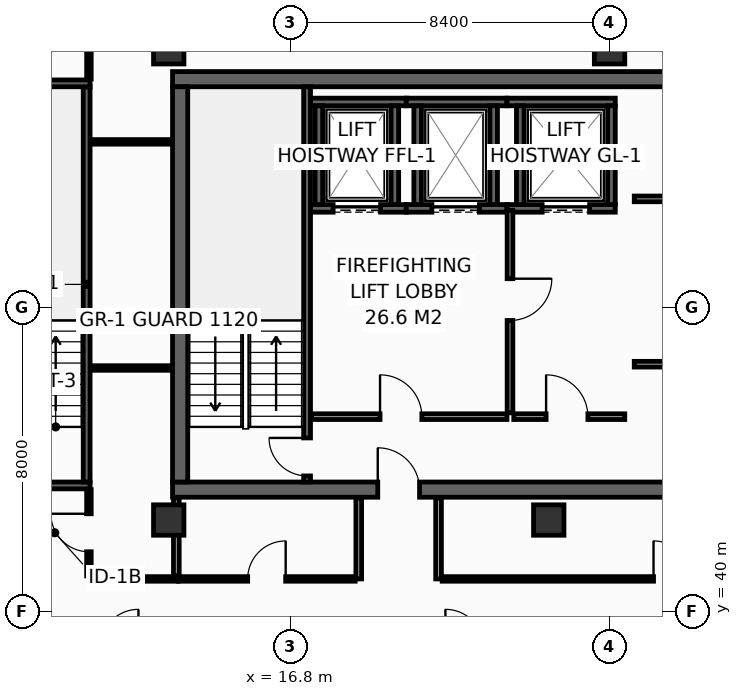
"""IFC4 building model, lengths in metres.
Left out: names, types, materials, properties, quantities, classifications, styles, units other than length and angle.
Written with IfcOpenShell. Run it as: python <this file> out.ifc"""

import sys

from ifc_helpers import new_model, si_unit, direction, frame, frame_2d, origin, origin_2d, place, context, subcontext, project, spatial, rectangle, hollow_rectangle, extrude, element, fill, save


model = new_model("IFC4")
c1 = context("Model", 3, precision=1e-05, world=origin(), true_north=direction((0.0, 1.0)))
c2 = subcontext(c1, "Body", "Model", "MODEL_VIEW")
j1 = project(units=[si_unit("LENGTHUNIT", "METRE"), si_unit("PLANEANGLEUNIT", "RADIAN")], contexts=[c1])
p1 = place(None, origin())
s1 = spatial("IfcSite", under=j1, at=p1, CompositionType="ELEMENT")
p2 = place(p1, origin())
s2 = spatial("IfcBuilding", under=s1, at=p2, CompositionType="ELEMENT")
p3 = place(p2, frame((0.0, 0.0, 253.4)))
s3 = spatial("IfcBuildingStorey", under=s2, at=p3, CompositionType="ELEMENT", Elevation=253.4)
p4 = place(p3, frame((13.7, 43.2, 0.0), z_axis=(0.0, 0.0, 1.0), x_axis=(1.0, 0.0, 0.0)))
e1 = element("IfcWall", 1, at=p4, inside=s3, PredefinedType="SHEAR", context=c2, shape_type="SweptSolid", body=[
    extrude(rectangle(XDim=32.5, YDim=0.4, at=frame_2d((16.25, 0.0))), origin(), (0.0, 0.0, 1.0), 3.55),
])
p5 = place(p4, frame((5.4, 0.0, 0.0)))
e2 = element("IfcOpeningElement", 2, at=p5, cuts=e1, PredefinedType="OPENING", context=c2, shape_type="SweptSolid", body=[
    extrude(rectangle(XDim=1.1, YDim=2.15, at=frame_2d((0.55, 1.075))), frame((0.0, 0.21, 0.0), z_axis=(0.0, -1.0, 0.0), x_axis=(1.0, 0.0, 0.0)), (0.0, 0.0, 1.0), 0.42),
])
p6 = place(p4, frame((25.6, 0.0, 0.0)))
e3 = element("IfcOpeningElement", 3, at=p6, cuts=e1, PredefinedType="OPENING", context=c2, shape_type="SweptSolid", body=[
    extrude(rectangle(XDim=1.1, YDim=2.15, at=frame_2d((0.55, 1.075))), frame((0.0, 0.21, 0.0), z_axis=(0.0, -1.0, 0.0), x_axis=(1.0, 0.0, 0.0)), (0.0, 0.0, 1.0), 0.42),
])
p7 = place(p3, frame((13.7, 54.0, 0.0), z_axis=(0.0, 0.0, 1.0), x_axis=(1.0, 0.0, 0.0)))
e4 = element("IfcWall", 4, at=p7, inside=s3, PredefinedType="SHEAR", context=c2, shape_type="SweptSolid", body=[
    extrude(rectangle(XDim=32.5, YDim=0.4, at=frame_2d((16.25, 0.0))), origin(), (0.0, 0.0, 1.0), 3.55),
])
p8 = place(p3, frame((13.9, 43.4, 0.0), z_axis=(0.0, 0.0, 1.0), x_axis=(0.0, 1.0, 0.0)))
e5 = element("IfcWall", 5, at=p8, inside=s3, PredefinedType="SHEAR", context=c2, shape_type="SweptSolid", body=[
    extrude(rectangle(XDim=10.4, YDim=0.4, at=frame_2d((5.2, 0.0))), origin(), (0.0, 0.0, 1.0), 3.55),
])
for number, where, z_axis, x_axis in (
    (6, (13.6, 54.8, 0.0), (0.0, 0.0, 1.0), (1.0, 0.0, 0.0)),
    (7, (25.2, 54.8, 0.0), (0.0, 0.0, 1.0), (1.0, 0.0, 0.0)),
    (8, (13.6, 42.4, 0.0), (0.0, 0.0, 1.0), (1.0, 0.0, 0.0)),
    (9, (23.6, 42.4, 0.0), (0.0, 0.0, 1.0), (1.0, 0.0, 0.0)),
):
    element("IfcColumn", number, at=place(p3, frame(where, z_axis=z_axis, x_axis=x_axis)), inside=s3, PredefinedType="COLUMN", context=c2, shape_type="SweptSolid", body=[
        extrude(hollow_rectangle(XDim=0.8, YDim=0.8, WallThickness=0.036, at=origin_2d()), origin(), (0.0, 0.0, 1.0), 3.8),
    ])
p9 = place(p3, frame((17.33, 50.6, 0.0), z_axis=(0.0, 0.0, 1.0), x_axis=(1.0, 0.0, 0.0)))
e10 = element("IfcWall", 10, at=p9, inside=s3, PredefinedType="SHEAR", context=c2, shape_type="SweptSolid", body=[
    extrude(rectangle(XDim=2.52, YDim=0.2, at=frame_2d((1.26, 0.0))), origin(), (0.0, 0.0, 1.0), 3.55),
])
p10 = place(p9, frame((0.595, 0.0, 0.0)))
e11 = element("IfcOpeningElement", 11, at=p10, cuts=e10, PredefinedType="OPENING", context=c2, shape_type="SweptSolid", body=[
    extrude(rectangle(XDim=1.25, YDim=2.3, at=frame_2d((0.625, 1.15))), frame((0.0, 0.11, 0.0), z_axis=(0.0, -1.0, 0.0), x_axis=(1.0, 0.0, 0.0)), (0.0, 0.0, 1.0), 0.22),
])
p11 = place(p3, frame((17.33, 53.4, 0.0), z_axis=(0.0, 0.0, 1.0), x_axis=(1.0, 0.0, 0.0)))
e12 = element("IfcWall", 12, at=p11, inside=s3, PredefinedType="SHEAR", context=c2, shape_type="SweptSolid", body=[
    extrude(rectangle(XDim=2.52, YDim=0.2, at=frame_2d((1.26, 0.0))), origin(), (0.0, 0.0, 1.0), 3.55),
])
for number, where, z_axis, x_axis in (
    (13, (17.55, 50.7, 0.0), (0.0, 0.0, 1.0), (0.0, 1.0, 0.0)),
    (14, (19.55, 50.7, 0.0), (0.0, 0.0, 1.0), (0.0, 1.0, 0.0)),
):
    element("IfcWall", number, at=place(p3, frame(where, z_axis=z_axis, x_axis=x_axis)), inside=s3, PredefinedType="SHEAR", context=c2, shape_type="SweptSolid", body=[
        extrude(rectangle(XDim=2.6, YDim=0.2, at=frame_2d((1.3, 0.0))), origin(), (0.0, 0.0, 1.0), 3.55),
    ])
p12 = place(p3, frame((19.85, 50.6, 0.0), z_axis=(0.0, 0.0, 1.0), x_axis=(1.0, 0.0, 0.0)))
e15 = element("IfcWall", 15, at=p12, inside=s3, PredefinedType="SHEAR", context=c2, shape_type="SweptSolid", body=[
    extrude(rectangle(XDim=2.65, YDim=0.2, at=frame_2d((1.325, 0.0))), origin(), (0.0, 0.0, 1.0), 3.55),
])
p13 = place(p12, frame((0.675, 0.0, 0.0)))
e16 = element("IfcOpeningElement", 16, at=p13, cuts=e15, PredefinedType="OPENING", context=c2, shape_type="SweptSolid", body=[
    extrude(rectangle(XDim=1.25, YDim=2.3, at=frame_2d((0.625, 1.15))), frame((0.0, 0.11, 0.0), z_axis=(0.0, -1.0, 0.0), x_axis=(1.0, 0.0, 0.0)), (0.0, 0.0, 1.0), 0.22),
])
p14 = place(p3, frame((19.85, 53.4, 0.0), z_axis=(0.0, 0.0, 1.0), x_axis=(1.0, 0.0, 0.0)))
e17 = element("IfcWall", 17, at=p14, inside=s3, PredefinedType="SHEAR", context=c2, shape_type="SweptSolid", body=[
    extrude(rectangle(XDim=2.65, YDim=0.2, at=frame_2d((1.325, 0.0))), origin(), (0.0, 0.0, 1.0), 3.55),
])
for number, where, z_axis, x_axis in (
    (18, (20.15, 50.7, 0.0), (0.0, 0.0, 1.0), (0.0, 1.0, 0.0)),
    (19, (22.15, 50.7, 0.0), (0.0, 0.0, 1.0), (0.0, 1.0, 0.0)),
):
    element("IfcWall", number, at=place(p3, frame(where, z_axis=z_axis, x_axis=x_axis)), inside=s3, PredefinedType="SHEAR", context=c2, shape_type="SweptSolid", body=[
        extrude(rectangle(XDim=2.6, YDim=0.2, at=frame_2d((1.3, 0.0))), origin(), (0.0, 0.0, 1.0), 3.55),
    ])
p15 = place(p3, frame((22.5, 50.6, 0.0), z_axis=(0.0, 0.0, 1.0), x_axis=(1.0, 0.0, 0.0)))
e20 = element("IfcWall", 20, at=p15, inside=s3, PredefinedType="SHEAR", context=c2, shape_type="SweptSolid", body=[
    extrude(rectangle(XDim=2.85, YDim=0.2, at=frame_2d((1.425, 0.0))), origin(), (0.0, 0.0, 1.0), 3.55),
])
p16 = place(p15, frame((0.925, 0.0, 0.0)))
e21 = element("IfcOpeningElement", 21, at=p16, cuts=e20, PredefinedType="OPENING", context=c2, shape_type="SweptSolid", body=[
    extrude(rectangle(XDim=1.25, YDim=2.3, at=frame_2d((0.625, 1.15))), frame((0.0, 0.11, 0.0), z_axis=(0.0, -1.0, 0.0), x_axis=(1.0, 0.0, 0.0)), (0.0, 0.0, 1.0), 0.22),
])
p17 = place(p3, frame((22.5, 53.4, 0.0), z_axis=(0.0, 0.0, 1.0), x_axis=(1.0, 0.0, 0.0)))
e22 = element("IfcWall", 22, at=p17, inside=s3, PredefinedType="SHEAR", context=c2, shape_type="SweptSolid", body=[
    extrude(rectangle(XDim=2.85, YDim=0.2, at=frame_2d((1.425, 0.0))), origin(), (0.0, 0.0, 1.0), 3.55),
])
for number, where, z_axis, x_axis in (
    (23, (22.85, 50.7, 0.0), (0.0, 0.0, 1.0), (0.0, 1.0, 0.0)),
    (24, (25.25, 50.7, 0.0), (0.0, 0.0, 1.0), (0.0, 1.0, 0.0)),
):
    element("IfcWall", number, at=place(p3, frame(where, z_axis=z_axis, x_axis=x_axis)), inside=s3, PredefinedType="SHEAR", context=c2, shape_type="SweptSolid", body=[
        extrude(rectangle(XDim=2.6, YDim=0.2, at=frame_2d((1.3, 0.0))), origin(), (0.0, 0.0, 1.0), 3.55),
    ])
p18 = place(p3, frame((17.24, 43.4, 0.0), z_axis=(0.0, 0.0, 1.0), x_axis=(0.0, 1.0, 0.0)))
e25 = element("IfcWall", 25, at=p18, inside=s3, PredefinedType="SHEAR", context=c2, shape_type="SweptSolid", body=[
    extrude(rectangle(XDim=10.4, YDim=0.18, at=frame_2d((5.2, 0.0))), origin(), (0.0, 0.0, 1.0), 3.55),
])
p19 = place(p18, frame((0.16, 0.0, 0.0)))
e26 = element("IfcOpeningElement", 26, at=p19, cuts=e25, PredefinedType="OPENING", context=c2, shape_type="SweptSolid", body=[
    extrude(rectangle(XDim=1.0, YDim=2.15, at=frame_2d((0.5, 1.075))), frame((0.0, 0.1, 0.0), z_axis=(0.0, -1.0, 0.0), x_axis=(1.0, 0.0, 0.0)), (0.0, 0.0, 1.0), 0.2),
])
p20 = place(p3, frame((8.12, 43.31, 0.0), z_axis=(0.0, 0.0, 1.0), x_axis=(1.0, 0.0, 0.0)))
e27 = element("IfcWall", 27, at=p20, inside=s3, PredefinedType="SHEAR", context=c2, shape_type="SweptSolid", body=[
    extrude(rectangle(XDim=3.41, YDim=0.18, at=frame_2d((1.705, 0.0))), origin(), (0.0, 0.0, 1.0), 3.55),
])
p21 = place(p20, frame((1.15, 0.0, 0.0)))
e28 = element("IfcOpeningElement", 28, at=p21, cuts=e27, PredefinedType="OPENING", context=c2, shape_type="SweptSolid", body=[
    extrude(rectangle(XDim=1.1, YDim=2.15, at=frame_2d((0.55, 1.075))), frame((0.0, 0.1, 0.0), z_axis=(0.0, -1.0, 0.0), x_axis=(1.0, 0.0, 0.0)), (0.0, 0.0, 1.0), 0.2),
])
p22 = place(p3, frame((11.44, 43.4, 0.0), z_axis=(0.0, 0.0, 1.0), x_axis=(0.0, 1.0, 0.0)))
e29 = element("IfcWall", 29, at=p22, inside=s3, PredefinedType="SHEAR", context=c2, shape_type="SweptSolid", body=[
    extrude(rectangle(XDim=10.4, YDim=0.18, at=frame_2d((5.2, 0.0))), origin(), (0.0, 0.0, 1.0), 3.55),
])
p23 = place(p3, frame((11.53, 53.89, 0.0), z_axis=(0.0, 0.0, 1.0), x_axis=(-1.0, 0.0, 0.0)))
e30 = element("IfcWall", 30, at=p23, inside=s3, PredefinedType="SHEAR", context=c2, shape_type="SweptSolid", body=[
    extrude(rectangle(XDim=3.41, YDim=0.18, at=frame_2d((1.705, 0.0))), origin(), (0.0, 0.0, 1.0), 3.55),
])
p24 = place(p3, frame((17.36, 45.12, 0.0), z_axis=(0.0, 0.0, 1.0), x_axis=(1.0, 0.0, 0.0)))
e31 = element("IfcWall", 31, at=p24, inside=s3, PredefinedType="PARTITIONING", context=c2, shape_type="SweptSolid", body=[
    extrude(rectangle(XDim=5.14, YDim=0.15, at=frame_2d((2.57, 0.0))), origin(), (0.0, 0.0, 1.0), 3.55),
])
p25 = place(p24, frame((1.8, 0.0, 0.0)))
e32 = element("IfcOpeningElement", 32, at=p25, cuts=e31, PredefinedType="OPENING", context=c2, shape_type="SweptSolid", body=[
    extrude(rectangle(XDim=1.1, YDim=2.15, at=frame_2d((0.55, 1.075))), frame((0.0, 0.085, 0.0), z_axis=(0.0, -1.0, 0.0), x_axis=(1.0, 0.0, 0.0)), (0.0, 0.0, 1.0), 0.17),
])
p26 = place(p3, frame((22.58, 50.55, 0.0), z_axis=(0.0, 0.0, 1.0), x_axis=(0.0, -1.0, 0.0)))
e33 = element("IfcWall", 33, at=p26, inside=s3, PredefinedType="PARTITIONING", context=c2, shape_type="SweptSolid", body=[
    extrude(rectangle(XDim=5.33, YDim=0.15, at=frame_2d((2.665, 0.0))), origin(), (0.0, 0.0, 1.0), 3.55),
])
p27 = place(p26, frame((1.8, 0.0, 0.0)))
e34 = element("IfcOpeningElement", 34, at=p27, cuts=e33, PredefinedType="OPENING", context=c2, shape_type="SweptSolid", body=[
    extrude(rectangle(XDim=1.1, YDim=2.15, at=frame_2d((0.55, 1.075))), frame((0.0, 0.085, 0.0), z_axis=(0.0, -1.0, 0.0), x_axis=(1.0, 0.0, 0.0)), (0.0, 0.0, 1.0), 0.17),
])
p28 = place(p3, frame((22.68, 45.12, 0.0), z_axis=(0.0, 0.0, 1.0), x_axis=(1.0, 0.0, 0.0)))
e35 = element("IfcWall", 35, at=p28, inside=s3, PredefinedType="PARTITIONING", context=c2, shape_type="SweptSolid", body=[
    extrude(rectangle(XDim=2.92, YDim=0.15, at=frame_2d((1.46, 0.0))), origin(), (0.0, 0.0, 1.0), 3.55),
])
p29 = place(p28, frame((0.85, 0.0, 0.0)))
e36 = element("IfcOpeningElement", 36, at=p29, cuts=e35, PredefinedType="OPENING", context=c2, shape_type="SweptSolid", body=[
    extrude(rectangle(XDim=1.1, YDim=2.15, at=frame_2d((0.55, 1.075))), frame((0.0, 0.085, 0.0), z_axis=(0.0, -1.0, 0.0), x_axis=(1.0, 0.0, 0.0)), (0.0, 0.0, 1.0), 0.17),
])
p30 = place(p3, frame((25.85, 50.85, 0.0), z_axis=(0.0, 0.0, 1.0), x_axis=(1.0, 0.0, 0.0)))
e37 = element("IfcWall", 37, at=p30, inside=s3, PredefinedType="PARTITIONING", context=c2, shape_type="SweptSolid", body=[
    extrude(rectangle(XDim=7.65, YDim=0.15, at=frame_2d((3.825, 0.0))), origin(), (0.0, 0.0, 1.0), 3.55),
])
p31 = place(p30, frame((1.25, 0.0, 0.0)))
e38 = element("IfcOpeningElement", 38, at=p31, cuts=e37, PredefinedType="OPENING", context=c2, shape_type="SweptSolid", body=[
    extrude(rectangle(XDim=0.95, YDim=2.15, at=frame_2d((0.475, 1.075))), frame((0.0, 0.085, 0.0), z_axis=(0.0, -1.0, 0.0), x_axis=(1.0, 0.0, 0.0)), (0.0, 0.0, 1.0), 0.17),
])
p32 = place(p3, frame((25.85, 46.5, 0.0), z_axis=(0.0, 0.0, 1.0), x_axis=(1.0, 0.0, 0.0)))
e39 = element("IfcWall", 39, at=p32, inside=s3, PredefinedType="PARTITIONING", context=c2, shape_type="SweptSolid", body=[
    extrude(rectangle(XDim=7.65, YDim=0.15, at=frame_2d((3.825, 0.0))), origin(), (0.0, 0.0, 1.0), 3.55),
])
p33 = place(p32, frame((2.8, 0.0, 0.0)))
e40 = element("IfcOpeningElement", 40, at=p33, cuts=e39, PredefinedType="OPENING", context=c2, shape_type="SweptSolid", body=[
    extrude(rectangle(XDim=0.95, YDim=2.15, at=frame_2d((0.475, 1.075))), frame((0.0, 0.085, 0.0), z_axis=(0.0, -1.0, 0.0), x_axis=(1.0, 0.0, 0.0)), (0.0, 0.0, 1.0), 0.17),
])
p34 = place(p3, frame((11.5, 40.85, 0.0), z_axis=(0.0, 0.0, 1.0), x_axis=(1.0, 0.0, 0.0)))
e41 = element("IfcWall", 41, at=p34, inside=s3, PredefinedType="PARTITIONING", context=c2, shape_type="SweptSolid", body=[
    extrude(rectangle(XDim=2.35, YDim=0.12, at=frame_2d((1.175, 0.0))), origin(), (0.0, 0.0, 1.0), 3.55),
])
p35 = place(p3, frame((11.55, 52.35, 0.0), z_axis=(0.0, 0.0, 1.0), x_axis=(1.0, 0.0, 0.0)))
e42 = element("IfcWall", 42, at=p35, inside=s3, PredefinedType="PARTITIONING", context=c2, shape_type="SweptSolid", body=[
    extrude(rectangle(XDim=2.13, YDim=0.12, at=frame_2d((1.065, 0.0))), origin(), (0.0, 0.0, 1.0), 3.55),
])
p36 = place(p3, frame((11.5, 54.0, 0.0), z_axis=(0.0, 0.0, 1.0), x_axis=(0.0, 1.0, 0.0)))
e43 = element("IfcWall", 43, at=p36, inside=s3, PredefinedType="PARTITIONING", context=c2, shape_type="SweptSolid", body=[
    extrude(rectangle(XDim=1.995, YDim=0.12, at=frame_2d((0.998, 0.0))), origin(), (0.0, 0.0, 1.0), 2.935),
])
p37 = place(p3, frame((11.55, 46.4, 0.0), z_axis=(0.0, 0.0, 1.0), x_axis=(1.0, 0.0, 0.0)))
e44 = element("IfcWall", 44, at=p37, inside=s3, PredefinedType="PARTITIONING", context=c2, shape_type="SweptSolid", body=[
    extrude(rectangle(XDim=2.13, YDim=0.12, at=frame_2d((1.065, 0.0))), origin(), (0.0, 0.0, 1.0), 3.55),
])
p38 = place(p3, frame((11.5, 40.93, 0.0), z_axis=(0.0, 0.0, 1.0), x_axis=(0.0, 1.0, 0.0)))
e45 = element("IfcWall", 45, at=p38, inside=s3, PredefinedType="PARTITIONING", context=c2, shape_type="SweptSolid", body=[
    extrude(rectangle(XDim=2.27, YDim=0.12, at=frame_2d((1.135, 0.0))), origin(), (0.0, 0.0, 1.0), 2.947),
])
p39 = place(p38, frame((0.635, 0.0, 0.0)))
e46 = element("IfcOpeningElement", 46, at=p39, cuts=e45, PredefinedType="OPENING", context=c2, shape_type="SweptSolid", body=[
    extrude(rectangle(XDim=1.0, YDim=2.15, at=frame_2d((0.5, 1.075))), frame((0.0, 0.07, 0.0), z_axis=(0.0, -1.0, 0.0), x_axis=(1.0, 0.0, 0.0)), (0.0, 0.0, 1.0), 0.14),
])
p40 = place(p3, frame((13.8, 40.93, 0.0), z_axis=(0.0, 0.0, 1.0), x_axis=(0.0, 1.0, 0.0)))
e47 = element("IfcWall", 47, at=p40, inside=s3, PredefinedType="PARTITIONING", context=c2, shape_type="SweptSolid", body=[
    extrude(rectangle(XDim=2.05, YDim=0.15, at=frame_2d((1.025, 0.0))), origin(), (0.0, 0.0, 1.0), 3.55),
])
for number, where, z_axis, x_axis in (
    (48, (18.6, 40.85, 0.0), (0.0, 0.0, 1.0), (0.0, 1.0, 0.0)),
    (49, (20.7, 40.85, 0.0), (0.0, 0.0, 1.0), (0.0, 1.0, 0.0)),
):
    element("IfcWall", number, at=place(p3, frame(where, z_axis=z_axis, x_axis=x_axis)), inside=s3, PredefinedType="PARTITIONING", context=c2, shape_type="SweptSolid", body=[
        extrude(rectangle(XDim=2.13, YDim=0.15, at=frame_2d((1.065, 0.0))), origin(), (0.0, 0.0, 1.0), 3.55),
    ])
p41 = place(p3, frame((13.85, 40.85, 0.0), z_axis=(0.0, 0.0, 1.0), x_axis=(1.0, 0.0, 0.0)))
e50 = element("IfcWall", 50, at=p41, inside=s3, PredefinedType="PARTITIONING", context=c2, shape_type="SweptSolid", body=[
    extrude(rectangle(XDim=4.655, YDim=0.12, at=frame_2d((2.327, 0.0))), origin(), (0.0, 0.0, 1.0), 3.55),
])
p42 = place(p41, frame((1.827, 0.0, 0.0)))
e51 = element("IfcOpeningElement", 51, at=p42, cuts=e50, PredefinedType="OPENING", context=c2, shape_type="SweptSolid", body=[
    extrude(rectangle(XDim=1.0, YDim=2.15, at=frame_2d((0.5, 1.075))), frame((0.0, 0.07, 0.0), z_axis=(0.0, -1.0, 0.0), x_axis=(1.0, 0.0, 0.0)), (0.0, 0.0, 1.0), 0.14),
])
p43 = place(p3, frame((20.795, 40.85, 0.0), z_axis=(0.0, 0.0, 1.0), x_axis=(1.0, 0.0, 0.0)))
e52 = element("IfcWall", 52, at=p43, inside=s3, PredefinedType="PARTITIONING", context=c2, shape_type="SweptSolid", body=[
    extrude(rectangle(XDim=12.125, YDim=0.12, at=frame_2d((6.062, 0.0))), origin(), (0.0, 0.0, 1.0), 2.947),
])
p44 = place(p43, frame((5.562, 0.0, 0.0)))
e53 = element("IfcOpeningElement", 53, at=p44, cuts=e52, PredefinedType="OPENING", context=c2, shape_type="SweptSolid", body=[
    extrude(rectangle(XDim=1.0, YDim=2.15, at=frame_2d((0.5, 1.075))), frame((0.0, 0.07, 0.0), z_axis=(0.0, -1.0, 0.0), x_axis=(1.0, 0.0, 0.0)), (0.0, 0.0, 1.0), 0.14),
])
p45 = place(p10, origin())
e54 = element("IfcDoor", 54, at=p45, inside=s3, OperationType="SLIDING_TO_LEFT", PredefinedType="DOOR", context=c2, shape_type="SweptSolid", body=[
    extrude(rectangle(XDim=1.25, YDim=2.3, at=frame_2d((0.625, 1.15))), frame((0.0, 0.025, 0.0), z_axis=(0.0, -1.0, 0.0), x_axis=(1.0, 0.0, 0.0)), (0.0, 0.0, 1.0), 0.05),
])
fill(e11, e54)
p46 = place(p13, origin())
e55 = element("IfcDoor", 55, at=p46, inside=s3, OperationType="SLIDING_TO_LEFT", PredefinedType="DOOR", context=c2, shape_type="SweptSolid", body=[
    extrude(rectangle(XDim=1.25, YDim=2.3, at=frame_2d((0.625, 1.15))), frame((0.0, 0.025, 0.0), z_axis=(0.0, -1.0, 0.0), x_axis=(1.0, 0.0, 0.0)), (0.0, 0.0, 1.0), 0.05),
])
fill(e16, e55)
p47 = place(p16, origin())
e56 = element("IfcDoor", 56, at=p47, inside=s3, OperationType="SLIDING_TO_LEFT", PredefinedType="DOOR", context=c2, shape_type="SweptSolid", body=[
    extrude(rectangle(XDim=1.25, YDim=2.3, at=frame_2d((0.625, 1.15))), frame((0.0, 0.025, 0.0), z_axis=(0.0, -1.0, 0.0), x_axis=(1.0, 0.0, 0.0)), (0.0, 0.0, 1.0), 0.05),
])
fill(e21, e56)
p48 = place(p19, origin())
e57 = element("IfcDoor", 57, at=p48, inside=s3, OperationType="SINGLE_SWING_RIGHT", PredefinedType="DOOR", context=c2, shape_type="SweptSolid", body=[
    extrude(rectangle(XDim=1.0, YDim=2.15, at=frame_2d((0.5, 1.075))), frame((0.0, 0.025, 0.0), z_axis=(0.0, -1.0, 0.0), x_axis=(1.0, 0.0, 0.0)), (0.0, 0.0, 1.0), 0.05),
])
fill(e26, e57)
p49 = place(p25, origin())
e58 = element("IfcDoor", 58, at=p49, inside=s3, OperationType="SINGLE_SWING_LEFT", PredefinedType="DOOR", context=c2, shape_type="SweptSolid", body=[
    extrude(rectangle(XDim=1.1, YDim=2.15, at=frame_2d((0.55, 1.075))), frame((0.0, 0.025, 0.0), z_axis=(0.0, -1.0, 0.0), x_axis=(1.0, 0.0, 0.0)), (0.0, 0.0, 1.0), 0.05),
])
fill(e32, e58)
p50 = place(p27, origin())
e59 = element("IfcDoor", 59, at=p50, inside=s3, OperationType="SINGLE_SWING_LEFT", PredefinedType="DOOR", context=c2, shape_type="SweptSolid", body=[
    extrude(rectangle(XDim=1.1, YDim=2.15, at=frame_2d((0.55, 1.075))), frame((0.0, 0.025, 0.0), z_axis=(0.0, -1.0, 0.0), x_axis=(1.0, 0.0, 0.0)), (0.0, 0.0, 1.0), 0.05),
])
fill(e34, e59)
p51 = place(p29, origin())
e60 = element("IfcDoor", 60, at=p51, inside=s3, OperationType="SINGLE_SWING_LEFT", PredefinedType="DOOR", context=c2, shape_type="SweptSolid", body=[
    extrude(rectangle(XDim=1.1, YDim=2.15, at=frame_2d((0.55, 1.075))), frame((0.0, 0.025, 0.0), z_axis=(0.0, -1.0, 0.0), x_axis=(1.0, 0.0, 0.0)), (0.0, 0.0, 1.0), 0.05),
])
fill(e36, e60)
p52 = place(p5, origin())
e61 = element("IfcDoor", 61, at=p52, inside=s3, OperationType="SINGLE_SWING_LEFT", PredefinedType="DOOR", context=c2, shape_type="SweptSolid", body=[
    extrude(rectangle(XDim=1.1, YDim=2.15, at=frame_2d((0.55, 1.075))), frame((0.0, 0.025, 0.0), z_axis=(0.0, -1.0, 0.0), x_axis=(1.0, 0.0, 0.0)), (0.0, 0.0, 1.0), 0.05),
])
fill(e2, e61)
p53 = place(p39, origin())
e62 = element("IfcDoor", 62, at=p53, inside=s3, OperationType="SINGLE_SWING_RIGHT", PredefinedType="DOOR", context=c2, shape_type="SweptSolid", body=[
    extrude(rectangle(XDim=1.0, YDim=2.15, at=frame_2d((0.5, 1.075))), frame((0.0, 0.025, 0.0), z_axis=(0.0, -1.0, 0.0), x_axis=(1.0, 0.0, 0.0)), (0.0, 0.0, 1.0), 0.05),
])
fill(e46, e62)
p54 = place(p42, origin())
e63 = element("IfcDoor", 63, at=p54, inside=s3, OperationType="SINGLE_SWING_RIGHT", PredefinedType="DOOR", context=c2, shape_type="SweptSolid", body=[
    extrude(rectangle(XDim=1.0, YDim=2.15, at=frame_2d((0.5, 1.075))), frame((0.0, 0.025, 0.0), z_axis=(0.0, -1.0, 0.0), x_axis=(1.0, 0.0, 0.0)), (0.0, 0.0, 1.0), 0.05),
])
fill(e51, e63)
p55 = place(p44, origin())
e64 = element("IfcDoor", 64, at=p55, inside=s3, OperationType="SINGLE_SWING_LEFT", PredefinedType="DOOR", context=c2, shape_type="SweptSolid", body=[
    extrude(rectangle(XDim=1.0, YDim=2.15, at=frame_2d((0.5, 1.075))), frame((0.0, 0.025, 0.0), z_axis=(0.0, -1.0, 0.0), x_axis=(1.0, 0.0, 0.0)), (0.0, 0.0, 1.0), 0.05),
])
fill(e53, e64)
save(model, sys.argv[1])
